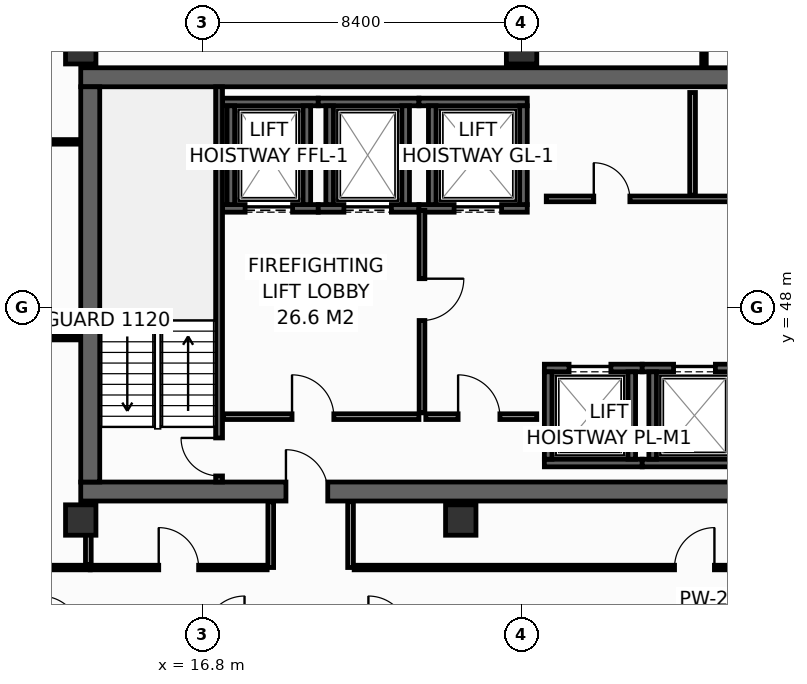
"""IFC4 building model, lengths in metres.
Left out: names, types, materials, properties, quantities, classifications, styles, units other than length and angle.
Written with IfcOpenShell. Run it as: python <this file> out.ifc"""

import sys

from ifc_helpers import new_model, si_unit, direction, frame, frame_2d, origin, origin_2d, place, context, subcontext, project, spatial, rectangle, hollow_rectangle, extrude, element, fill, save


model = new_model("IFC4")
c1 = context("Model", 3, precision=1e-05, world=origin(), true_north=direction((0.0, 1.0)))
c2 = subcontext(c1, "Body", "Model", "MODEL_VIEW")
j1 = project(units=[si_unit("LENGTHUNIT", "METRE"), si_unit("PLANEANGLEUNIT", "RADIAN")], contexts=[c1])
p1 = place(None, origin())
s1 = spatial("IfcSite", under=j1, at=p1, CompositionType="ELEMENT")
p2 = place(p1, origin())
s2 = spatial("IfcBuilding", under=s1, at=p2, CompositionType="ELEMENT")
p3 = place(p2, frame((0.0, 0.0, 198.0)))
s3 = spatial("IfcBuildingStorey", under=s2, at=p3, CompositionType="ELEMENT", Elevation=198.0)
p4 = place(p3, frame((13.6, 43.15, 0.0), z_axis=(0.0, 0.0, 1.0), x_axis=(1.0, 0.0, 0.0)))
e1 = element("IfcWall", 1, at=p4, inside=s3, PredefinedType="SHEAR", context=c2, shape_type="SweptSolid", body=[
    extrude(rectangle(XDim=32.7, YDim=0.5, at=frame_2d((16.35, 0.0))), origin(), (0.0, 0.0, 1.0), 3.55),
])
p5 = place(p4, frame((5.4, 0.0, 0.0)))
e2 = element("IfcOpeningElement", 2, at=p5, cuts=e1, PredefinedType="OPENING", context=c2, shape_type="SweptSolid", body=[
    extrude(rectangle(XDim=1.1, YDim=2.15, at=frame_2d((0.55, 1.075))), frame((0.0, 0.26, 0.0), z_axis=(0.0, -1.0, 0.0), x_axis=(1.0, 0.0, 0.0)), (0.0, 0.0, 1.0), 0.52),
])
p6 = place(p4, frame((25.6, 0.0, 0.0)))
e3 = element("IfcOpeningElement", 3, at=p6, cuts=e1, PredefinedType="OPENING", context=c2, shape_type="SweptSolid", body=[
    extrude(rectangle(XDim=1.1, YDim=2.15, at=frame_2d((0.55, 1.075))), frame((0.0, 0.26, 0.0), z_axis=(0.0, -1.0, 0.0), x_axis=(1.0, 0.0, 0.0)), (0.0, 0.0, 1.0), 0.52),
])
p7 = place(p3, frame((13.6, 54.05, 0.0), z_axis=(0.0, 0.0, 1.0), x_axis=(1.0, 0.0, 0.0)))
e4 = element("IfcWall", 4, at=p7, inside=s3, PredefinedType="SHEAR", context=c2, shape_type="SweptSolid", body=[
    extrude(rectangle(XDim=32.7, YDim=0.5, at=frame_2d((16.35, 0.0))), origin(), (0.0, 0.0, 1.0), 3.55),
])
p8 = place(p3, frame((13.85, 43.4, 0.0), z_axis=(0.0, 0.0, 1.0), x_axis=(0.0, 1.0, 0.0)))
e5 = element("IfcWall", 5, at=p8, inside=s3, PredefinedType="SHEAR", context=c2, shape_type="SweptSolid", body=[
    extrude(rectangle(XDim=10.4, YDim=0.5, at=frame_2d((5.2, 0.0))), origin(), (0.0, 0.0, 1.0), 3.55),
])
for number, where, z_axis, x_axis in (
    (6, (13.6, 54.8, 0.0), (0.0, 0.0, 1.0), (1.0, 0.0, 0.0)),
    (7, (25.2, 54.8, 0.0), (0.0, 0.0, 1.0), (1.0, 0.0, 0.0)),
    (8, (13.6, 42.4, 0.0), (0.0, 0.0, 1.0), (1.0, 0.0, 0.0)),
    (9, (23.6, 42.4, 0.0), (0.0, 0.0, 1.0), (1.0, 0.0, 0.0)),
):
    element("IfcColumn", number, at=place(p3, frame(where, z_axis=z_axis, x_axis=x_axis)), inside=s3, PredefinedType="COLUMN", context=c2, shape_type="SweptSolid", body=[
        extrude(hollow_rectangle(XDim=0.8, YDim=0.8, WallThickness=0.036, at=origin_2d()), origin(), (0.0, 0.0, 1.0), 3.8),
    ])
p9 = place(p3, frame((17.33, 50.6, 0.0), z_axis=(0.0, 0.0, 1.0), x_axis=(1.0, 0.0, 0.0)))
e10 = element("IfcWall", 10, at=p9, inside=s3, PredefinedType="SHEAR", context=c2, shape_type="SweptSolid", body=[
    extrude(rectangle(XDim=2.52, YDim=0.2, at=frame_2d((1.26, 0.0))), origin(), (0.0, 0.0, 1.0), 3.55),
])
p10 = place(p9, frame((0.595, 0.0, 0.0)))
e11 = element("IfcOpeningElement", 11, at=p10, cuts=e10, PredefinedType="OPENING", context=c2, shape_type="SweptSolid", body=[
    extrude(rectangle(XDim=1.25, YDim=2.3, at=frame_2d((0.625, 1.15))), frame((0.0, 0.11, 0.0), z_axis=(0.0, -1.0, 0.0), x_axis=(1.0, 0.0, 0.0)), (0.0, 0.0, 1.0), 0.22),
])
p11 = place(p3, frame((17.33, 53.4, 0.0), z_axis=(0.0, 0.0, 1.0), x_axis=(1.0, 0.0, 0.0)))
e12 = element("IfcWall", 12, at=p11, inside=s3, PredefinedType="SHEAR", context=c2, shape_type="SweptSolid", body=[
    extrude(rectangle(XDim=2.52, YDim=0.2, at=frame_2d((1.26, 0.0))), origin(), (0.0, 0.0, 1.0), 3.55),
])
for number, where, z_axis, x_axis in (
    (13, (17.55, 50.7, 0.0), (0.0, 0.0, 1.0), (0.0, 1.0, 0.0)),
    (14, (19.55, 50.7, 0.0), (0.0, 0.0, 1.0), (0.0, 1.0, 0.0)),
):
    element("IfcWall", number, at=place(p3, frame(where, z_axis=z_axis, x_axis=x_axis)), inside=s3, PredefinedType="SHEAR", context=c2, shape_type="SweptSolid", body=[
        extrude(rectangle(XDim=2.6, YDim=0.2, at=frame_2d((1.3, 0.0))), origin(), (0.0, 0.0, 1.0), 3.55),
    ])
p12 = place(p3, frame((19.85, 50.6, 0.0), z_axis=(0.0, 0.0, 1.0), x_axis=(1.0, 0.0, 0.0)))
e15 = element("IfcWall", 15, at=p12, inside=s3, PredefinedType="SHEAR", context=c2, shape_type="SweptSolid", body=[
    extrude(rectangle(XDim=2.65, YDim=0.2, at=frame_2d((1.325, 0.0))), origin(), (0.0, 0.0, 1.0), 3.55),
])
p13 = place(p12, frame((0.675, 0.0, 0.0)))
e16 = element("IfcOpeningElement", 16, at=p13, cuts=e15, PredefinedType="OPENING", context=c2, shape_type="SweptSolid", body=[
    extrude(rectangle(XDim=1.25, YDim=2.3, at=frame_2d((0.625, 1.15))), frame((0.0, 0.11, 0.0), z_axis=(0.0, -1.0, 0.0), x_axis=(1.0, 0.0, 0.0)), (0.0, 0.0, 1.0), 0.22),
])
p14 = place(p3, frame((19.85, 53.4, 0.0), z_axis=(0.0, 0.0, 1.0), x_axis=(1.0, 0.0, 0.0)))
e17 = element("IfcWall", 17, at=p14, inside=s3, PredefinedType="SHEAR", context=c2, shape_type="SweptSolid", body=[
    extrude(rectangle(XDim=2.65, YDim=0.2, at=frame_2d((1.325, 0.0))), origin(), (0.0, 0.0, 1.0), 3.55),
])
for number, where, z_axis, x_axis in (
    (18, (20.15, 50.7, 0.0), (0.0, 0.0, 1.0), (0.0, 1.0, 0.0)),
    (19, (22.15, 50.7, 0.0), (0.0, 0.0, 1.0), (0.0, 1.0, 0.0)),
):
    element("IfcWall", number, at=place(p3, frame(where, z_axis=z_axis, x_axis=x_axis)), inside=s3, PredefinedType="SHEAR", context=c2, shape_type="SweptSolid", body=[
        extrude(rectangle(XDim=2.6, YDim=0.2, at=frame_2d((1.3, 0.0))), origin(), (0.0, 0.0, 1.0), 3.55),
    ])
p15 = place(p3, frame((22.5, 50.6, 0.0), z_axis=(0.0, 0.0, 1.0), x_axis=(1.0, 0.0, 0.0)))
e20 = element("IfcWall", 20, at=p15, inside=s3, PredefinedType="SHEAR", context=c2, shape_type="SweptSolid", body=[
    extrude(rectangle(XDim=2.85, YDim=0.2, at=frame_2d((1.425, 0.0))), origin(), (0.0, 0.0, 1.0), 3.55),
])
p16 = place(p15, frame((0.925, 0.0, 0.0)))
e21 = element("IfcOpeningElement", 21, at=p16, cuts=e20, PredefinedType="OPENING", context=c2, shape_type="SweptSolid", body=[
    extrude(rectangle(XDim=1.25, YDim=2.3, at=frame_2d((0.625, 1.15))), frame((0.0, 0.11, 0.0), z_axis=(0.0, -1.0, 0.0), x_axis=(1.0, 0.0, 0.0)), (0.0, 0.0, 1.0), 0.22),
])
p17 = place(p3, frame((22.5, 53.4, 0.0), z_axis=(0.0, 0.0, 1.0), x_axis=(1.0, 0.0, 0.0)))
e22 = element("IfcWall", 22, at=p17, inside=s3, PredefinedType="SHEAR", context=c2, shape_type="SweptSolid", body=[
    extrude(rectangle(XDim=2.85, YDim=0.2, at=frame_2d((1.425, 0.0))), origin(), (0.0, 0.0, 1.0), 3.55),
])
for number, where, z_axis, x_axis in (
    (23, (22.85, 50.7, 0.0), (0.0, 0.0, 1.0), (0.0, 1.0, 0.0)),
    (24, (25.25, 50.7, 0.0), (0.0, 0.0, 1.0), (0.0, 1.0, 0.0)),
):
    element("IfcWall", number, at=place(p3, frame(where, z_axis=z_axis, x_axis=x_axis)), inside=s3, PredefinedType="SHEAR", context=c2, shape_type="SweptSolid", body=[
        extrude(rectangle(XDim=2.6, YDim=0.2, at=frame_2d((1.3, 0.0))), origin(), (0.0, 0.0, 1.0), 3.55),
    ])
p18 = place(p3, frame((25.8, 43.9, 0.0), z_axis=(0.0, 0.0, 1.0), x_axis=(1.0, 0.0, 0.0)))
e25 = element("IfcWall", 25, at=p18, inside=s3, PredefinedType="SHEAR", context=c2, shape_type="SweptSolid", body=[
    extrude(rectangle(XDim=2.575, YDim=0.2, at=frame_2d((1.288, 0.0))), origin(), (0.0, 0.0, 1.0), 3.55),
])
p19 = place(p3, frame((25.8, 46.4, 0.0), z_axis=(0.0, 0.0, 1.0), x_axis=(1.0, 0.0, 0.0)))
e26 = element("IfcWall", 26, at=p19, inside=s3, PredefinedType="SHEAR", context=c2, shape_type="SweptSolid", body=[
    extrude(rectangle(XDim=2.575, YDim=0.2, at=frame_2d((1.288, 0.0))), origin(), (0.0, 0.0, 1.0), 3.55),
])
p20 = place(p19, frame((0.65, 0.0, 0.0)))
e27 = element("IfcOpeningElement", 27, at=p20, cuts=e26, PredefinedType="OPENING", context=c2, shape_type="SweptSolid", body=[
    extrude(rectangle(XDim=1.1, YDim=2.2, at=frame_2d((0.55, 1.1))), frame((0.0, 0.11, 0.0), z_axis=(0.0, -1.0, 0.0), x_axis=(1.0, 0.0, 0.0)), (0.0, 0.0, 1.0), 0.22),
])
for number, where, z_axis, x_axis in (
    (28, (25.9, 44.0, 0.0), (0.0, 0.0, 1.0), (0.0, 1.0, 0.0)),
    (29, (28.1, 44.0, 0.0), (0.0, 0.0, 1.0), (0.0, 1.0, 0.0)),
):
    element("IfcWall", number, at=place(p3, frame(where, z_axis=z_axis, x_axis=x_axis)), inside=s3, PredefinedType="SHEAR", context=c2, shape_type="SweptSolid", body=[
        extrude(rectangle(XDim=2.3, YDim=0.2, at=frame_2d((1.15, 0.0))), origin(), (0.0, 0.0, 1.0), 3.55),
    ])
p21 = place(p3, frame((28.375, 43.9, 0.0), z_axis=(0.0, 0.0, 1.0), x_axis=(1.0, 0.0, 0.0)))
e30 = element("IfcWall", 30, at=p21, inside=s3, PredefinedType="SHEAR", context=c2, shape_type="SweptSolid", body=[
    extrude(rectangle(XDim=2.75, YDim=0.2, at=frame_2d((1.375, 0.0))), origin(), (0.0, 0.0, 1.0), 3.55),
])
p22 = place(p3, frame((28.375, 46.4, 0.0), z_axis=(0.0, 0.0, 1.0), x_axis=(1.0, 0.0, 0.0)))
e31 = element("IfcWall", 31, at=p22, inside=s3, PredefinedType="SHEAR", context=c2, shape_type="SweptSolid", body=[
    extrude(rectangle(XDim=2.75, YDim=0.2, at=frame_2d((1.375, 0.0))), origin(), (0.0, 0.0, 1.0), 3.55),
])
p23 = place(p22, frame((0.825, 0.0, 0.0)))
e32 = element("IfcOpeningElement", 32, at=p23, cuts=e31, PredefinedType="OPENING", context=c2, shape_type="SweptSolid", body=[
    extrude(rectangle(XDim=1.1, YDim=2.2, at=frame_2d((0.55, 1.1))), frame((0.0, 0.11, 0.0), z_axis=(0.0, -1.0, 0.0), x_axis=(1.0, 0.0, 0.0)), (0.0, 0.0, 1.0), 0.22),
])
p24 = place(p3, frame((28.65, 44.0, 0.0), z_axis=(0.0, 0.0, 1.0), x_axis=(0.0, 1.0, 0.0)))
e33 = element("IfcWall", 33, at=p24, inside=s3, PredefinedType="SHEAR", context=c2, shape_type="SweptSolid", body=[
    extrude(rectangle(XDim=2.3, YDim=0.2, at=frame_2d((1.15, 0.0))), origin(), (0.0, 0.0, 1.0), 3.55),
])
p25 = place(p3, frame((17.24, 43.4, 0.0), z_axis=(0.0, 0.0, 1.0), x_axis=(0.0, 1.0, 0.0)))
e34 = element("IfcWall", 34, at=p25, inside=s3, PredefinedType="SHEAR", context=c2, shape_type="SweptSolid", body=[
    extrude(rectangle(XDim=10.4, YDim=0.18, at=frame_2d((5.2, 0.0))), origin(), (0.0, 0.0, 1.0), 3.55),
])
p26 = place(p25, frame((0.16, 0.0, 0.0)))
e35 = element("IfcOpeningElement", 35, at=p26, cuts=e34, PredefinedType="OPENING", context=c2, shape_type="SweptSolid", body=[
    extrude(rectangle(XDim=1.0, YDim=2.15, at=frame_2d((0.5, 1.075))), frame((0.0, 0.1, 0.0), z_axis=(0.0, -1.0, 0.0), x_axis=(1.0, 0.0, 0.0)), (0.0, 0.0, 1.0), 0.2),
])
p27 = place(p3, frame((17.36, 45.12, 0.0), z_axis=(0.0, 0.0, 1.0), x_axis=(1.0, 0.0, 0.0)))
e36 = element("IfcWall", 36, at=p27, inside=s3, PredefinedType="PARTITIONING", context=c2, shape_type="SweptSolid", body=[
    extrude(rectangle(XDim=5.14, YDim=0.15, at=frame_2d((2.57, 0.0))), origin(), (0.0, 0.0, 1.0), 3.55),
])
p28 = place(p27, frame((1.8, 0.0, 0.0)))
e37 = element("IfcOpeningElement", 37, at=p28, cuts=e36, PredefinedType="OPENING", context=c2, shape_type="SweptSolid", body=[
    extrude(rectangle(XDim=1.1, YDim=2.15, at=frame_2d((0.55, 1.075))), frame((0.0, 0.085, 0.0), z_axis=(0.0, -1.0, 0.0), x_axis=(1.0, 0.0, 0.0)), (0.0, 0.0, 1.0), 0.17),
])
p29 = place(p3, frame((22.58, 50.55, 0.0), z_axis=(0.0, 0.0, 1.0), x_axis=(0.0, -1.0, 0.0)))
e38 = element("IfcWall", 38, at=p29, inside=s3, PredefinedType="PARTITIONING", context=c2, shape_type="SweptSolid", body=[
    extrude(rectangle(XDim=5.33, YDim=0.15, at=frame_2d((2.665, 0.0))), origin(), (0.0, 0.0, 1.0), 3.55),
])
p30 = place(p29, frame((1.8, 0.0, 0.0)))
e39 = element("IfcOpeningElement", 39, at=p30, cuts=e38, PredefinedType="OPENING", context=c2, shape_type="SweptSolid", body=[
    extrude(rectangle(XDim=1.1, YDim=2.15, at=frame_2d((0.55, 1.075))), frame((0.0, 0.085, 0.0), z_axis=(0.0, -1.0, 0.0), x_axis=(1.0, 0.0, 0.0)), (0.0, 0.0, 1.0), 0.17),
])
p31 = place(p3, frame((22.68, 45.12, 0.0), z_axis=(0.0, 0.0, 1.0), x_axis=(1.0, 0.0, 0.0)))
e40 = element("IfcWall", 40, at=p31, inside=s3, PredefinedType="PARTITIONING", context=c2, shape_type="SweptSolid", body=[
    extrude(rectangle(XDim=2.92, YDim=0.15, at=frame_2d((1.46, 0.0))), origin(), (0.0, 0.0, 1.0), 3.55),
])
p32 = place(p31, frame((0.85, 0.0, 0.0)))
e41 = element("IfcOpeningElement", 41, at=p32, cuts=e40, PredefinedType="OPENING", context=c2, shape_type="SweptSolid", body=[
    extrude(rectangle(XDim=1.1, YDim=2.15, at=frame_2d((0.55, 1.075))), frame((0.0, 0.085, 0.0), z_axis=(0.0, -1.0, 0.0), x_axis=(1.0, 0.0, 0.0)), (0.0, 0.0, 1.0), 0.17),
])
p33 = place(p3, frame((25.85, 50.85, 0.0), z_axis=(0.0, 0.0, 1.0), x_axis=(1.0, 0.0, 0.0)))
e42 = element("IfcWall", 42, at=p33, inside=s3, PredefinedType="PARTITIONING", context=c2, shape_type="SweptSolid", body=[
    extrude(rectangle(XDim=7.65, YDim=0.15, at=frame_2d((3.825, 0.0))), origin(), (0.0, 0.0, 1.0), 3.55),
])
p34 = place(p33, frame((1.25, 0.0, 0.0)))
e43 = element("IfcOpeningElement", 43, at=p34, cuts=e42, PredefinedType="OPENING", context=c2, shape_type="SweptSolid", body=[
    extrude(rectangle(XDim=0.95, YDim=2.15, at=frame_2d((0.475, 1.075))), frame((0.0, 0.085, 0.0), z_axis=(0.0, -1.0, 0.0), x_axis=(1.0, 0.0, 0.0)), (0.0, 0.0, 1.0), 0.17),
])
p35 = place(p33, frame((5.05, 0.0, 0.0)))
e44 = element("IfcOpeningElement", 44, at=p35, cuts=e42, PredefinedType="OPENING", context=c2, shape_type="SweptSolid", body=[
    extrude(rectangle(XDim=0.95, YDim=2.15, at=frame_2d((0.475, 1.075))), frame((0.0, 0.085, 0.0), z_axis=(0.0, -1.0, 0.0), x_axis=(1.0, 0.0, 0.0)), (0.0, 0.0, 1.0), 0.17),
])
p36 = place(p3, frame((29.7, 50.95, 0.0), z_axis=(0.0, 0.0, 1.0), x_axis=(0.0, 1.0, 0.0)))
e45 = element("IfcWall", 45, at=p36, inside=s3, PredefinedType="PARTITIONING", context=c2, shape_type="SweptSolid", body=[
    extrude(rectangle(XDim=2.7, YDim=0.15, at=frame_2d((1.35, 0.0))), origin(), (0.0, 0.0, 1.0), 3.55),
])
p37 = place(p3, frame((11.5, 41.15, 0.0), z_axis=(0.0, 0.0, 1.0), x_axis=(1.0, 0.0, 0.0)))
e46 = element("IfcWall", 46, at=p37, inside=s3, PredefinedType="PARTITIONING", context=c2, shape_type="SweptSolid", body=[
    extrude(rectangle(XDim=2.35, YDim=0.12, at=frame_2d((1.175, 0.0))), origin(), (0.0, 0.0, 1.0), 3.55),
])
p38 = place(p3, frame((11.55, 52.35, 0.0), z_axis=(0.0, 0.0, 1.0), x_axis=(1.0, 0.0, 0.0)))
e47 = element("IfcWall", 47, at=p38, inside=s3, PredefinedType="PARTITIONING", context=c2, shape_type="SweptSolid", body=[
    extrude(rectangle(XDim=2.03, YDim=0.12, at=frame_2d((1.015, 0.0))), origin(), (0.0, 0.0, 1.0), 3.55),
])
p39 = place(p3, frame((30.0, 54.32, 0.0), z_axis=(0.0, 0.0, 1.0), x_axis=(0.0, 1.0, 0.0)))
e48 = element("IfcWall", 48, at=p39, inside=s3, PredefinedType="PARTITIONING", context=c2, shape_type="SweptSolid", body=[
    extrude(rectangle(XDim=1.675, YDim=0.12, at=frame_2d((0.837, 0.0))), origin(), (0.0, 0.0, 1.0), 2.935),
])
p40 = place(p3, frame((11.55, 47.2, 0.0), z_axis=(0.0, 0.0, 1.0), x_axis=(1.0, 0.0, 0.0)))
e49 = element("IfcWall", 49, at=p40, inside=s3, PredefinedType="PARTITIONING", context=c2, shape_type="SweptSolid", body=[
    extrude(rectangle(XDim=2.03, YDim=0.12, at=frame_2d((1.015, 0.0))), origin(), (0.0, 0.0, 1.0), 3.55),
])
p41 = place(p3, frame((13.8, 41.23, 0.0), z_axis=(0.0, 0.0, 1.0), x_axis=(0.0, 1.0, 0.0)))
e50 = element("IfcWall", 50, at=p41, inside=s3, PredefinedType="PARTITIONING", context=c2, shape_type="SweptSolid", body=[
    extrude(rectangle(XDim=1.65, YDim=0.15, at=frame_2d((0.825, 0.0))), origin(), (0.0, 0.0, 1.0), 3.55),
])
for number, where, z_axis, x_axis in (
    (51, (18.6, 41.15, 0.0), (0.0, 0.0, 1.0), (0.0, 1.0, 0.0)),
    (52, (20.7, 41.15, 0.0), (0.0, 0.0, 1.0), (0.0, 1.0, 0.0)),
):
    element("IfcWall", number, at=place(p3, frame(where, z_axis=z_axis, x_axis=x_axis)), inside=s3, PredefinedType="PARTITIONING", context=c2, shape_type="SweptSolid", body=[
        extrude(rectangle(XDim=1.73, YDim=0.15, at=frame_2d((0.865, 0.0))), origin(), (0.0, 0.0, 1.0), 3.55),
    ])
p42 = place(p3, frame((13.85, 41.15, 0.0), z_axis=(0.0, 0.0, 1.0), x_axis=(1.0, 0.0, 0.0)))
e53 = element("IfcWall", 53, at=p42, inside=s3, PredefinedType="PARTITIONING", context=c2, shape_type="SweptSolid", body=[
    extrude(rectangle(XDim=4.655, YDim=0.12, at=frame_2d((2.327, 0.0))), origin(), (0.0, 0.0, 1.0), 3.55),
])
p43 = place(p42, frame((1.802, 0.0, 0.0)))
e54 = element("IfcOpeningElement", 54, at=p43, cuts=e53, PredefinedType="OPENING", context=c2, shape_type="SweptSolid", body=[
    extrude(rectangle(XDim=1.05, YDim=2.15, at=frame_2d((0.525, 1.075))), frame((0.0, 0.07, 0.0), z_axis=(0.0, -1.0, 0.0), x_axis=(1.0, 0.0, 0.0)), (0.0, 0.0, 1.0), 0.14),
])
p44 = place(p3, frame((20.795, 41.15, 0.0), z_axis=(0.0, 0.0, 1.0), x_axis=(1.0, 0.0, 0.0)))
e55 = element("IfcWall", 55, at=p44, inside=s3, PredefinedType="PARTITIONING", context=c2, shape_type="SweptSolid", body=[
    extrude(rectangle(XDim=17.91, YDim=0.12, at=frame_2d((8.955, 0.0))), origin(), (0.0, 0.0, 1.0), 2.835),
])
p45 = place(p44, frame((8.43, 0.0, 0.0)))
e56 = element("IfcOpeningElement", 56, at=p45, cuts=e55, PredefinedType="OPENING", context=c2, shape_type="SweptSolid", body=[
    extrude(rectangle(XDim=1.05, YDim=2.15, at=frame_2d((0.525, 1.075))), frame((0.0, 0.07, 0.0), z_axis=(0.0, -1.0, 0.0), x_axis=(1.0, 0.0, 0.0)), (0.0, 0.0, 1.0), 0.14),
])
p46 = place(p10, origin())
e57 = element("IfcDoor", 57, at=p46, inside=s3, OperationType="SLIDING_TO_LEFT", PredefinedType="DOOR", context=c2, shape_type="SweptSolid", body=[
    extrude(rectangle(XDim=1.25, YDim=2.3, at=frame_2d((0.625, 1.15))), frame((0.0, 0.025, 0.0), z_axis=(0.0, -1.0, 0.0), x_axis=(1.0, 0.0, 0.0)), (0.0, 0.0, 1.0), 0.05),
])
fill(e11, e57)
p47 = place(p13, origin())
e58 = element("IfcDoor", 58, at=p47, inside=s3, OperationType="SLIDING_TO_LEFT", PredefinedType="DOOR", context=c2, shape_type="SweptSolid", body=[
    extrude(rectangle(XDim=1.25, YDim=2.3, at=frame_2d((0.625, 1.15))), frame((0.0, 0.025, 0.0), z_axis=(0.0, -1.0, 0.0), x_axis=(1.0, 0.0, 0.0)), (0.0, 0.0, 1.0), 0.05),
])
fill(e16, e58)
p48 = place(p16, origin())
e59 = element("IfcDoor", 59, at=p48, inside=s3, OperationType="SLIDING_TO_LEFT", PredefinedType="DOOR", context=c2, shape_type="SweptSolid", body=[
    extrude(rectangle(XDim=1.25, YDim=2.3, at=frame_2d((0.625, 1.15))), frame((0.0, 0.025, 0.0), z_axis=(0.0, -1.0, 0.0), x_axis=(1.0, 0.0, 0.0)), (0.0, 0.0, 1.0), 0.05),
])
fill(e21, e59)
p49 = place(p20, origin())
e60 = element("IfcDoor", 60, at=p49, inside=s3, OperationType="SLIDING_TO_LEFT", PredefinedType="DOOR", context=c2, shape_type="SweptSolid", body=[
    extrude(rectangle(XDim=1.1, YDim=2.2, at=frame_2d((0.55, 1.1))), frame((0.0, 0.025, 0.0), z_axis=(0.0, -1.0, 0.0), x_axis=(1.0, 0.0, 0.0)), (0.0, 0.0, 1.0), 0.05),
])
fill(e27, e60)
p50 = place(p23, origin())
e61 = element("IfcDoor", 61, at=p50, inside=s3, OperationType="SLIDING_TO_LEFT", PredefinedType="DOOR", context=c2, shape_type="SweptSolid", body=[
    extrude(rectangle(XDim=1.1, YDim=2.2, at=frame_2d((0.55, 1.1))), frame((0.0, 0.025, 0.0), z_axis=(0.0, -1.0, 0.0), x_axis=(1.0, 0.0, 0.0)), (0.0, 0.0, 1.0), 0.05),
])
fill(e32, e61)
p51 = place(p26, origin())
e62 = element("IfcDoor", 62, at=p51, inside=s3, OperationType="SINGLE_SWING_RIGHT", PredefinedType="DOOR", context=c2, shape_type="SweptSolid", body=[
    extrude(rectangle(XDim=1.0, YDim=2.15, at=frame_2d((0.5, 1.075))), frame((0.0, 0.025, 0.0), z_axis=(0.0, -1.0, 0.0), x_axis=(1.0, 0.0, 0.0)), (0.0, 0.0, 1.0), 0.05),
])
fill(e35, e62)
p52 = place(p28, origin())
e63 = element("IfcDoor", 63, at=p52, inside=s3, OperationType="SINGLE_SWING_LEFT", PredefinedType="DOOR", context=c2, shape_type="SweptSolid", body=[
    extrude(rectangle(XDim=1.1, YDim=2.15, at=frame_2d((0.55, 1.075))), frame((0.0, 0.025, 0.0), z_axis=(0.0, -1.0, 0.0), x_axis=(1.0, 0.0, 0.0)), (0.0, 0.0, 1.0), 0.05),
])
fill(e37, e63)
p53 = place(p30, origin())
e64 = element("IfcDoor", 64, at=p53, inside=s3, OperationType="SINGLE_SWING_LEFT", PredefinedType="DOOR", context=c2, shape_type="SweptSolid", body=[
    extrude(rectangle(XDim=1.1, YDim=2.15, at=frame_2d((0.55, 1.075))), frame((0.0, 0.025, 0.0), z_axis=(0.0, -1.0, 0.0), x_axis=(1.0, 0.0, 0.0)), (0.0, 0.0, 1.0), 0.05),
])
fill(e39, e64)
p54 = place(p32, origin())
e65 = element("IfcDoor", 65, at=p54, inside=s3, OperationType="SINGLE_SWING_LEFT", PredefinedType="DOOR", context=c2, shape_type="SweptSolid", body=[
    extrude(rectangle(XDim=1.1, YDim=2.15, at=frame_2d((0.55, 1.075))), frame((0.0, 0.025, 0.0), z_axis=(0.0, -1.0, 0.0), x_axis=(1.0, 0.0, 0.0)), (0.0, 0.0, 1.0), 0.05),
])
fill(e41, e65)
p55 = place(p5, origin())
e66 = element("IfcDoor", 66, at=p55, inside=s3, OperationType="SINGLE_SWING_LEFT", PredefinedType="DOOR", context=c2, shape_type="SweptSolid", body=[
    extrude(rectangle(XDim=1.1, YDim=2.15, at=frame_2d((0.55, 1.075))), frame((0.0, 0.025, 0.0), z_axis=(0.0, -1.0, 0.0), x_axis=(1.0, 0.0, 0.0)), (0.0, 0.0, 1.0), 0.05),
])
fill(e2, e66)
p56 = place(p34, origin())
e67 = element("IfcDoor", 67, at=p56, inside=s3, OperationType="SINGLE_SWING_LEFT", PredefinedType="DOOR", context=c2, shape_type="SweptSolid", body=[
    extrude(rectangle(XDim=0.95, YDim=2.15, at=frame_2d((0.475, 1.075))), frame((0.0, 0.025, 0.0), z_axis=(0.0, -1.0, 0.0), x_axis=(1.0, 0.0, 0.0)), (0.0, 0.0, 1.0), 0.05),
])
fill(e43, e67)
p57 = place(p43, origin())
e68 = element("IfcDoor", 68, at=p57, inside=s3, OperationType="SINGLE_SWING_LEFT", PredefinedType="DOOR", context=c2, shape_type="SweptSolid", body=[
    extrude(rectangle(XDim=1.05, YDim=2.15, at=frame_2d((0.525, 1.075))), frame((0.0, 0.025, 0.0), z_axis=(0.0, -1.0, 0.0), x_axis=(1.0, 0.0, 0.0)), (0.0, 0.0, 1.0), 0.05),
])
fill(e54, e68)
p58 = place(p45, origin())
e69 = element("IfcDoor", 69, at=p58, inside=s3, OperationType="SINGLE_SWING_RIGHT", PredefinedType="DOOR", context=c2, shape_type="SweptSolid", body=[
    extrude(rectangle(XDim=1.05, YDim=2.15, at=frame_2d((0.525, 1.075))), frame((0.0, 0.025, 0.0), z_axis=(0.0, -1.0, 0.0), x_axis=(1.0, 0.0, 0.0)), (0.0, 0.0, 1.0), 0.05),
])
fill(e56, e69)
save(model, sys.argv[1])
